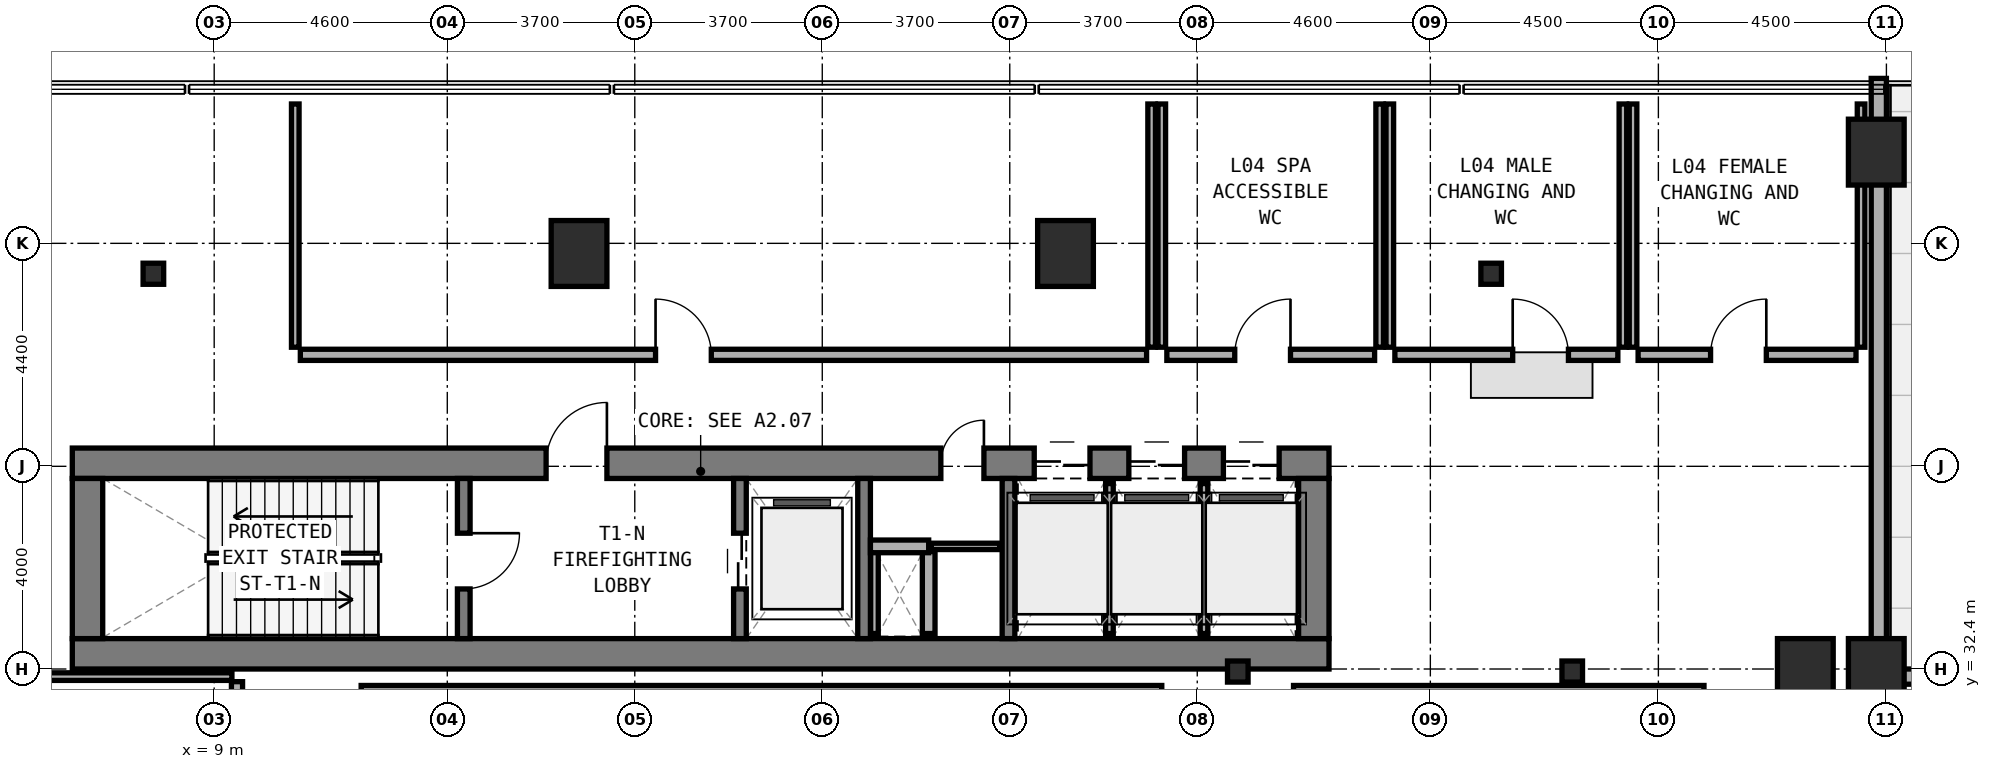
"""IFC4 building model, lengths in metres.
Left out: names, types, materials, properties, quantities, classifications, styles, units other than length and angle.
Written with IfcOpenShell. Run it as: python <this file> out.ifc"""

import sys

from ifc_helpers import new_model, si_unit, direction, frame, frame_2d, origin, origin_2d, place, context, subcontext, project, spatial, rectangle, i_section, extrude, element, fill, save


model = new_model("IFC4")
c1 = context("Model", 3, precision=1e-05, world=origin(), true_north=direction((0.0, 1.0)))
c2 = subcontext(c1, "Body", "Model", "MODEL_VIEW")
j1 = project(units=[si_unit("LENGTHUNIT", "METRE"), si_unit("PLANEANGLEUNIT", "RADIAN")], contexts=[c1])
p1 = place(None, origin())
s1 = spatial("IfcSite", under=j1, at=p1, CompositionType="ELEMENT")
p2 = place(p1, origin())
s2 = spatial("IfcBuilding", under=s1, at=p2, CompositionType="ELEMENT")
p3 = place(p2, frame((0.0, 0.0, 19.5)))
s3 = spatial("IfcBuildingStorey", under=s2, at=p3, CompositionType="ELEMENT", Elevation=19.5)
p4 = place(p3, frame((6.2, 32.7, 0.0), z_axis=(0.0, 0.0, 1.0), x_axis=(1.0, 0.0, 0.0)))
e1 = element("IfcWall", 1, at=p4, inside=s3, PredefinedType="SHEAR", context=c2, shape_type="SweptSolid", body=[
    extrude(rectangle(XDim=24.8, YDim=0.6, at=frame_2d((12.4, 0.0))), origin(), (0.0, 0.0, 1.0), 4.5),
])
p5 = place(p3, frame((6.2, 36.46, 0.0), z_axis=(0.0, 0.0, 1.0), x_axis=(1.0, 0.0, 0.0)))
e2 = element("IfcWall", 2, at=p5, inside=s3, PredefinedType="SHEAR", context=c2, shape_type="SweptSolid", body=[
    extrude(rectangle(XDim=24.8, YDim=0.6, at=frame_2d((12.4, 0.0))), origin(), (0.0, 0.0, 1.0), 4.5),
])
p6 = place(p5, frame((9.35, 0.0, 0.0)))
e3 = element("IfcOpeningElement", 3, at=p6, cuts=e2, PredefinedType="OPENING", context=c2, shape_type="SweptSolid", body=[
    extrude(rectangle(XDim=1.2, YDim=2.15, at=frame_2d((0.6, 1.075))), frame((0.0, 0.31, 0.0), z_axis=(0.0, -1.0, 0.0), x_axis=(1.0, 0.0, 0.0)), (0.0, 0.0, 1.0), 0.62),
])
p7 = place(p5, frame((17.14, 0.0, 0.0)))
e4 = element("IfcOpeningElement", 4, at=p7, cuts=e2, PredefinedType="OPENING", context=c2, shape_type="SweptSolid", body=[
    extrude(rectangle(XDim=0.85, YDim=2.1, at=frame_2d((0.425, 1.05))), frame((0.0, 0.31, 0.0), z_axis=(0.0, -1.0, 0.0), x_axis=(1.0, 0.0, 0.0)), (0.0, 0.0, 1.0), 0.62),
])
p8 = place(p5, frame((18.983, 0.0, 0.0)))
e5 = element("IfcOpeningElement", 5, at=p8, cuts=e2, PredefinedType="OPENING", context=c2, shape_type="SweptSolid", body=[
    extrude(rectangle(XDim=1.1, YDim=2.15, at=frame_2d((0.55, 1.075))), frame((0.0, 0.31, 0.0), z_axis=(0.0, -1.0, 0.0), x_axis=(1.0, 0.0, 0.0)), (0.0, 0.0, 1.0), 0.62),
])
p9 = place(p5, frame((20.85, 0.0, 0.0)))
e6 = element("IfcOpeningElement", 6, at=p9, cuts=e2, PredefinedType="OPENING", context=c2, shape_type="SweptSolid", body=[
    extrude(rectangle(XDim=1.1, YDim=2.15, at=frame_2d((0.55, 1.075))), frame((0.0, 0.31, 0.0), z_axis=(0.0, -1.0, 0.0), x_axis=(1.0, 0.0, 0.0)), (0.0, 0.0, 1.0), 0.62),
])
p10 = place(p5, frame((22.716, 0.0, 0.0)))
e7 = element("IfcOpeningElement", 7, at=p10, cuts=e2, PredefinedType="OPENING", context=c2, shape_type="SweptSolid", body=[
    extrude(rectangle(XDim=1.1, YDim=2.15, at=frame_2d((0.55, 1.075))), frame((0.0, 0.31, 0.0), z_axis=(0.0, -1.0, 0.0), x_axis=(1.0, 0.0, 0.0)), (0.0, 0.0, 1.0), 0.62),
])
for number, where, z_axis, x_axis in (
    (8, (6.5, 33.0, 0.0), (0.0, 0.0, 1.0), (0.0, 1.0, 0.0)),
    (9, (30.7, 33.0, 0.0), (0.0, 0.0, 1.0), (0.0, 1.0, 0.0)),
):
    element("IfcWall", number, at=place(p3, frame(where, z_axis=z_axis, x_axis=x_axis)), inside=s3, PredefinedType="SHEAR", context=c2, shape_type="SweptSolid", body=[
        extrude(rectangle(XDim=3.16, YDim=0.6, at=frame_2d((1.58, 0.0))), origin(), (0.0, 0.0, 1.0), 4.5),
    ])
p11 = place(p3, frame((13.925, 33.0, 0.0), z_axis=(0.0, 0.0, 1.0), x_axis=(0.0, 1.0, 0.0)))
e10 = element("IfcWall", 10, at=p11, inside=s3, PredefinedType="STANDARD", context=c2, shape_type="SweptSolid", body=[
    extrude(rectangle(XDim=3.16, YDim=0.25, at=frame_2d((1.58, 0.0))), origin(), (0.0, 0.0, 1.0), 4.22),
])
p12 = place(p11, frame((0.98, 0.0, 0.0)))
e11 = element("IfcOpeningElement", 11, at=p12, cuts=e10, PredefinedType="OPENING", context=c2, shape_type="SweptSolid", body=[
    extrude(rectangle(XDim=1.1, YDim=2.15, at=frame_2d((0.55, 1.075))), frame((0.0, 0.135, 0.0), z_axis=(0.0, -1.0, 0.0), x_axis=(1.0, 0.0, 0.0)), (0.0, 0.0, 1.0), 0.27),
])
p13 = place(p3, frame((19.375, 33.0, 0.0), z_axis=(0.0, 0.0, 1.0), x_axis=(0.0, 1.0, 0.0)))
e12 = element("IfcWall", 12, at=p13, inside=s3, PredefinedType="STANDARD", context=c2, shape_type="SweptSolid", body=[
    extrude(rectangle(XDim=3.16, YDim=0.25, at=frame_2d((1.58, 0.0))), origin(), (0.0, 0.0, 1.0), 4.22),
])
p14 = place(p13, frame((0.98, 0.0, 0.0)))
e13 = element("IfcOpeningElement", 13, at=p14, cuts=e12, PredefinedType="OPENING", context=c2, shape_type="SweptSolid", body=[
    extrude(rectangle(XDim=1.1, YDim=2.15, at=frame_2d((0.55, 1.075))), frame((0.0, 0.135, 0.0), z_axis=(0.0, -1.0, 0.0), x_axis=(1.0, 0.0, 0.0)), (0.0, 0.0, 1.0), 0.27),
])
for number, where, z_axis, x_axis in (
    (14, (21.825, 33.0, 0.0), (0.0, 0.0, 1.0), (0.0, 1.0, 0.0)),
    (15, (24.675, 33.0, 0.0), (0.0, 0.0, 1.0), (0.0, 1.0, 0.0)),
):
    element("IfcWall", number, at=place(p3, frame(where, z_axis=z_axis, x_axis=x_axis)), inside=s3, PredefinedType="STANDARD", context=c2, shape_type="SweptSolid", body=[
        extrude(rectangle(XDim=3.16, YDim=0.25, at=frame_2d((1.58, 0.0))), origin(), (0.0, 0.0, 1.0), 4.22),
    ])
for number, where, z_axis, x_axis in (
    (16, (16.2, 40.6, 0.0), (0.0, 0.0, 1.0), (1.0, 0.0, 0.0)),
    (17, (25.8, 40.6, 0.0), (0.0, 0.0, 1.0), (1.0, 0.0, 0.0)),
):
    element("IfcColumn", number, at=place(p3, frame(where, z_axis=z_axis, x_axis=x_axis)), inside=s3, PredefinedType="COLUMN", context=c2, shape_type="SweptSolid", body=[
        extrude(rectangle(XDim=1.1, YDim=1.3, at=origin_2d()), origin(), (0.0, 0.0, 1.0), 4.5),
    ])
for number, where, z_axis, x_axis in (
    (18, (34.2, 40.2, 0.0), (0.0, 0.0, 1.0), (1.0, 0.0, 0.0)),
    (19, (7.8, 40.2, 0.0), (0.0, 0.0, 1.0), (1.0, 0.0, 0.0)),
    (20, (35.8, 32.35, 0.0), (0.0, 0.0, 1.0), (1.0, 0.0, 0.0)),
    (21, (29.2, 32.35, 0.0), (0.0, 0.0, 1.0), (1.0, 0.0, 0.0)),
):
    element("IfcColumn", number, at=place(p3, frame(where, z_axis=z_axis, x_axis=x_axis)), inside=s3, PredefinedType="COLUMN", context=c2, shape_type="SweptSolid", body=[
        extrude(i_section(OverallWidth=0.406, OverallDepth=0.416, WebThickness=0.024, FlangeThickness=0.039, FilletRadius=0.015, at=origin_2d()), origin(), (0.0, 0.0, 1.0), 4.5),
    ])
for number, where, z_axis, x_axis in (
    (22, (40.4, 32.35, 0.0), (0.0, 0.0, 1.0), (1.0, 0.0, 0.0)),
    (23, (41.8, 32.35, 0.0), (0.0, 0.0, 1.0), (1.0, 0.0, 0.0)),
    (24, (41.8, 42.6, 0.0), (0.0, 0.0, 1.0), (1.0, 0.0, 0.0)),
):
    element("IfcColumn", number, at=place(p3, frame(where, z_axis=z_axis, x_axis=x_axis)), inside=s3, PredefinedType="COLUMN", context=c2, shape_type="SweptSolid", body=[
        extrude(rectangle(XDim=1.1, YDim=1.3, at=origin_2d()), origin(), (0.0, 0.0, 1.0), 4.5),
    ])
p15 = place(p3, frame((47.341, 32.25, 0.0), z_axis=(0.0, 0.0, 1.0), x_axis=(-1.0, 0.0, 0.0)))
e25 = element("IfcWall", 25, at=p15, inside=s3, PredefinedType="STANDARD", context=c2, shape_type="SweptSolid", body=[
    extrude(rectangle(XDim=5.366, YDim=0.3, at=frame_2d((2.683, 0.0))), origin(), (0.0, 0.0, 1.0), 4.22),
])
p16 = place(p15, frame((0.541, 0.0, 0.0)))
e26 = element("IfcOpeningElement", 26, at=p16, cuts=e25, PredefinedType="OPENING", context=c2, shape_type="SweptSolid", body=[
    extrude(rectangle(XDim=1.6, YDim=2.2, at=frame_2d((0.8, 1.1))), frame((0.0, 0.16, 0.0), z_axis=(0.0, -1.0, 0.0), x_axis=(1.0, 0.0, 0.0)), (0.0, 0.0, 1.0), 0.32),
])
p17 = place(p3, frame((41.85, 32.41, 0.0), z_axis=(0.0, 0.0, 1.0), x_axis=(0.0, 1.0, 0.0)))
e27 = element("IfcWall", 27, at=p17, inside=s3, PredefinedType="STANDARD", context=c2, shape_type="SweptSolid", body=[
    extrude(rectangle(XDim=11.645, YDim=0.3, at=frame_2d((5.823, 0.0))), origin(), (0.0, 0.0, 1.0), 4.22),
])
p18 = place(p3, frame((22.03, 33.1, 0.0), z_axis=(0.0, 0.0, 1.0), x_axis=(0.0, 1.0, 0.0)))
e28 = element("IfcWall", 28, at=p18, inside=s3, PredefinedType="PARTITIONING", context=c2, shape_type="SweptSolid", body=[
    extrude(rectangle(XDim=1.62, YDim=0.15, at=frame_2d((0.81, 0.0))), origin(), (0.0, 0.0, 1.0), 4.22),
])
p19 = place(p3, frame((23.1, 33.1, 0.0), z_axis=(0.0, 0.0, 1.0), x_axis=(0.0, 1.0, 0.0)))
e29 = element("IfcWall", 29, at=p19, inside=s3, PredefinedType="SOLIDWALL", context=c2, shape_type="SweptSolid", body=[
    extrude(rectangle(XDim=1.62, YDim=0.25, at=frame_2d((0.81, 0.0))), origin(), (0.0, 0.0, 1.0), 4.22),
])
p20 = place(p3, frame((21.95, 34.82, 0.0), z_axis=(0.0, 0.0, 1.0), x_axis=(1.0, 0.0, 0.0)))
e30 = element("IfcWall", 30, at=p20, inside=s3, PredefinedType="SOLIDWALL", context=c2, shape_type="SweptSolid", body=[
    extrude(rectangle(XDim=1.15, YDim=0.25, at=frame_2d((0.575, 0.0))), origin(), (0.0, 0.0, 1.0), 4.22),
])
p21 = place(p3, frame((23.15, 34.82, 0.0), z_axis=(0.0, 0.0, 1.0), x_axis=(1.0, 0.0, 0.0)))
e31 = element("IfcWall", 31, at=p21, inside=s3, PredefinedType="PARTITIONING", context=c2, shape_type="SweptSolid", body=[
    extrude(rectangle(XDim=1.35, YDim=0.125, at=frame_2d((0.675, 0.0))), origin(), (0.0, 0.0, 1.0), 4.22),
])
p22 = place(p3, frame((26.667, 33.1, 0.0), z_axis=(0.0, 0.0, 1.0), x_axis=(0.0, 1.0, 0.0)))
e32 = element("IfcWall", 32, at=p22, inside=s3, PredefinedType="PARTITIONING", context=c2, shape_type="SweptSolid", body=[
    extrude(rectangle(XDim=2.96, YDim=0.15, at=frame_2d((1.48, 0.0))), origin(), (0.0, 0.0, 1.0), 4.22),
])
p23 = place(p3, frame((28.533, 33.1, 0.0), z_axis=(0.0, 0.0, 1.0), x_axis=(0.0, 1.0, 0.0)))
e33 = element("IfcWall", 33, at=p23, inside=s3, PredefinedType="PARTITIONING", context=c2, shape_type="SweptSolid", body=[
    extrude(rectangle(XDim=2.96, YDim=0.15, at=frame_2d((1.48, 0.0))), origin(), (0.0, 0.0, 1.0), 3.295),
])
p24 = place(p3, frame((11.9, 32.0, 0.0), z_axis=(0.0, 0.0, 1.0), x_axis=(1.0, 0.0, 0.0)))
e34 = element("IfcWall", 34, at=p24, inside=s3, PredefinedType="PARTITIONING", context=c2, shape_type="SweptSolid", body=[
    extrude(rectangle(XDim=15.8, YDim=0.15, at=frame_2d((7.9, 0.0))), origin(), (0.0, 0.0, 1.0), 4.22),
])
for number, where, z_axis, x_axis in (
    (35, (10.6, 38.75, 0.0), (0.0, 0.0, 1.0), (0.0, 1.0, 0.0)),
    (36, (27.5, 38.75, 0.0), (0.0, 0.0, 1.0), (0.0, 1.0, 0.0)),
):
    element("IfcWall", number, at=place(p3, frame(where, z_axis=z_axis, x_axis=x_axis)), inside=s3, PredefinedType="PARTITIONING", context=c2, shape_type="SweptSolid", body=[
        extrude(rectangle(XDim=4.8, YDim=0.15, at=frame_2d((2.4, 0.0))), origin(), (0.0, 0.0, 1.0), 3.745),
    ])
p25 = place(p3, frame((10.7, 38.6, 0.0), z_axis=(0.0, 0.0, 1.0), x_axis=(1.0, 0.0, 0.0)))
e37 = element("IfcWall", 37, at=p25, inside=s3, PredefinedType="SOLIDWALL", context=c2, shape_type="SweptSolid", body=[
    extrude(rectangle(XDim=16.7, YDim=0.22, at=frame_2d((8.35, 0.0))), origin(), (0.0, 0.0, 1.0), 3.295),
])
p26 = place(p25, frame((7.01, 0.0, 0.0)))
e38 = element("IfcOpeningElement", 38, at=p26, cuts=e37, PredefinedType="OPENING", context=c2, shape_type="SweptSolid", body=[
    extrude(rectangle(XDim=1.1, YDim=2.1, at=frame_2d((0.55, 1.05))), frame((0.0, 0.12, 0.0), z_axis=(0.0, -1.0, 0.0), x_axis=(1.0, 0.0, 0.0)), (0.0, 0.0, 1.0), 0.24),
])
p27 = place(p3, frame((30.3, 32.0, 0.0), z_axis=(0.0, 0.0, 1.0), x_axis=(1.0, 0.0, 0.0)))
e39 = element("IfcWall", 39, at=p27, inside=s3, PredefinedType="PARTITIONING", context=c2, shape_type="SweptSolid", body=[
    extrude(rectangle(XDim=8.1, YDim=0.15, at=frame_2d((4.05, 0.0))), origin(), (0.0, 0.0, 1.0), 3.745),
])
for number, where, z_axis, x_axis in (
    (40, (27.7, 38.75, 0.0), (0.0, 0.0, 1.0), (0.0, 1.0, 0.0)),
    (41, (32.0, 38.75, 0.0), (0.0, 0.0, 1.0), (0.0, 1.0, 0.0)),
):
    element("IfcWall", number, at=place(p3, frame(where, z_axis=z_axis, x_axis=x_axis)), inside=s3, PredefinedType="PARTITIONING", context=c2, shape_type="SweptSolid", body=[
        extrude(rectangle(XDim=4.8, YDim=0.15, at=frame_2d((2.4, 0.0))), origin(), (0.0, 0.0, 1.0), 3.745),
    ])
p28 = place(p3, frame((27.8, 38.6, 0.0), z_axis=(0.0, 0.0, 1.0), x_axis=(1.0, 0.0, 0.0)))
e42 = element("IfcWall", 42, at=p28, inside=s3, PredefinedType="SOLIDWALL", context=c2, shape_type="SweptSolid", body=[
    extrude(rectangle(XDim=4.1, YDim=0.22, at=frame_2d((2.05, 0.0))), origin(), (0.0, 0.0, 1.0), 3.925),
])
p29 = place(p28, frame((1.34, 0.0, 0.0)))
e43 = element("IfcOpeningElement", 43, at=p29, cuts=e42, PredefinedType="OPENING", context=c2, shape_type="SweptSolid", body=[
    extrude(rectangle(XDim=1.1, YDim=2.1, at=frame_2d((0.55, 1.05))), frame((0.0, 0.12, 0.0), z_axis=(0.0, -1.0, 0.0), x_axis=(1.0, 0.0, 0.0)), (0.0, 0.0, 1.0), 0.24),
])
p30 = place(p3, frame((32.2, 38.75, 0.0), z_axis=(0.0, 0.0, 1.0), x_axis=(0.0, 1.0, 0.0)))
e44 = element("IfcWall", 44, at=p30, inside=s3, PredefinedType="PARTITIONING", context=c2, shape_type="SweptSolid", body=[
    extrude(rectangle(XDim=4.8, YDim=0.15, at=frame_2d((2.4, 0.0))), origin(), (0.0, 0.0, 1.0), 3.745),
])
p31 = place(p3, frame((36.8, 38.75, 0.0), z_axis=(0.0, 0.0, 1.0), x_axis=(0.0, 1.0, 0.0)))
e45 = element("IfcWall", 45, at=p31, inside=s3, PredefinedType="PARTITIONING", context=c2, shape_type="SweptSolid", body=[
    extrude(rectangle(XDim=4.8, YDim=0.15, at=frame_2d((2.4, 0.0))), origin(), (0.0, 0.0, 1.0), 4.22),
])
p32 = place(p3, frame((32.3, 38.6, 0.0), z_axis=(0.0, 0.0, 1.0), x_axis=(1.0, 0.0, 0.0)))
e46 = element("IfcWall", 46, at=p32, inside=s3, PredefinedType="SOLIDWALL", context=c2, shape_type="SweptSolid", body=[
    extrude(rectangle(XDim=4.4, YDim=0.22, at=frame_2d((2.2, 0.0))), origin(), (0.0, 0.0, 1.0), 3.295),
])
p33 = place(p32, frame((2.325, 0.0, 0.0)))
e47 = element("IfcOpeningElement", 47, at=p33, cuts=e46, PredefinedType="OPENING", context=c2, shape_type="SweptSolid", body=[
    extrude(rectangle(XDim=1.1, YDim=2.1, at=frame_2d((0.55, 1.05))), frame((0.0, 0.12, 0.0), z_axis=(0.0, -1.0, 0.0), x_axis=(1.0, 0.0, 0.0)), (0.0, 0.0, 1.0), 0.24),
])
for number, where, z_axis, x_axis in (
    (48, (37.0, 38.75, 0.0), (0.0, 0.0, 1.0), (0.0, 1.0, 0.0)),
    (49, (41.5, 38.75, 0.0), (0.0, 0.0, 1.0), (0.0, 1.0, 0.0)),
):
    element("IfcWall", number, at=place(p3, frame(where, z_axis=z_axis, x_axis=x_axis)), inside=s3, PredefinedType="PARTITIONING", context=c2, shape_type="SweptSolid", body=[
        extrude(rectangle(XDim=4.8, YDim=0.15, at=frame_2d((2.4, 0.0))), origin(), (0.0, 0.0, 1.0), 4.22),
    ])
p34 = place(p3, frame((37.1, 38.6, 0.0), z_axis=(0.0, 0.0, 1.0), x_axis=(1.0, 0.0, 0.0)))
e50 = element("IfcWall", 50, at=p34, inside=s3, PredefinedType="SOLIDWALL", context=c2, shape_type="SweptSolid", body=[
    extrude(rectangle(XDim=4.3, YDim=0.22, at=frame_2d((2.15, 0.0))), origin(), (0.0, 0.0, 1.0), 4.22),
])
p35 = place(p34, frame((1.43, 0.0, 0.0)))
e51 = element("IfcOpeningElement", 51, at=p35, cuts=e50, PredefinedType="OPENING", context=c2, shape_type="SweptSolid", body=[
    extrude(rectangle(XDim=1.1, YDim=2.1, at=frame_2d((0.55, 1.05))), frame((0.0, 0.12, 0.0), z_axis=(0.0, -1.0, 0.0), x_axis=(1.0, 0.0, 0.0)), (0.0, 0.0, 1.0), 0.24),
])
p36 = place(p3, frame((0.45, 32.25, 0.0), z_axis=(0.0, 0.0, 1.0), x_axis=(1.0, 0.0, 0.0)))
e52 = element("IfcWall", 52, at=p36, inside=s3, PredefinedType="PARTITIONING", context=c2, shape_type="SweptSolid", body=[
    extrude(rectangle(XDim=8.9, YDim=0.15, at=frame_2d((4.45, 0.0))), origin(), (0.0, 0.0, 1.0), 4.22),
])
p37 = place(p3, frame((9.45, 27.3, 0.0), z_axis=(0.0, 0.0, 1.0), x_axis=(0.0, 1.0, 0.0)))
e53 = element("IfcWall", 53, at=p37, inside=s3, PredefinedType="SOLIDWALL", context=c2, shape_type="SweptSolid", body=[
    extrude(rectangle(XDim=4.85, YDim=0.22, at=frame_2d((2.425, 0.0))), origin(), (0.0, 0.0, 1.0), 3.295),
])
p38 = place(p37, frame((1.678, 0.0, 0.0)))
e54 = element("IfcOpeningElement", 54, at=p38, cuts=e53, PredefinedType="OPENING", context=c2, shape_type="SweptSolid", body=[
    extrude(rectangle(XDim=1.1, YDim=2.1, at=frame_2d((0.55, 1.05))), frame((0.0, 0.12, 0.0), z_axis=(0.0, -1.0, 0.0), x_axis=(1.0, 0.0, 0.0)), (0.0, 0.0, 1.0), 0.24),
])
p39 = place(p12, frame((1.1, 0.0, 0.0), z_axis=(0.0, 0.0, 1.0), x_axis=(-1.0, 0.0, 0.0)))
e55 = element("IfcDoor", 55, at=p39, inside=s3, OperationType="SINGLE_SWING_LEFT", PredefinedType="DOOR", context=c2, shape_type="SweptSolid", body=[
    extrude(rectangle(XDim=1.1, YDim=2.15, at=frame_2d((0.55, 1.075))), frame((0.0, 0.025, 0.0), z_axis=(0.0, -1.0, 0.0), x_axis=(1.0, 0.0, 0.0)), (0.0, 0.0, 1.0), 0.05),
])
fill(e11, e55)
p40 = place(p6, origin())
e56 = element("IfcDoor", 56, at=p40, inside=s3, OperationType="SINGLE_SWING_RIGHT", PredefinedType="DOOR", context=c2, shape_type="SweptSolid", body=[
    extrude(rectangle(XDim=1.2, YDim=2.15, at=frame_2d((0.6, 1.075))), frame((0.0, 0.025, 0.0), z_axis=(0.0, -1.0, 0.0), x_axis=(1.0, 0.0, 0.0)), (0.0, 0.0, 1.0), 0.05),
])
fill(e3, e56)
p41 = place(p14, origin())
e57 = element("IfcDoor", 57, at=p41, inside=s3, OperationType="DOUBLE_DOOR_SLIDING", PredefinedType="DOOR", context=c2, shape_type="SweptSolid", body=[
    extrude(rectangle(XDim=1.1, YDim=2.15, at=frame_2d((0.55, 1.075))), frame((0.0, 0.025, 0.0), z_axis=(0.0, -1.0, 0.0), x_axis=(1.0, 0.0, 0.0)), (0.0, 0.0, 1.0), 0.05),
])
fill(e13, e57)
p42 = place(p7, origin())
e58 = element("IfcDoor", 58, at=p42, inside=s3, OperationType="SINGLE_SWING_RIGHT", PredefinedType="DOOR", context=c2, shape_type="SweptSolid", body=[
    extrude(rectangle(XDim=0.85, YDim=2.1, at=frame_2d((0.425, 1.05))), frame((0.0, 0.025, 0.0), z_axis=(0.0, -1.0, 0.0), x_axis=(1.0, 0.0, 0.0)), (0.0, 0.0, 1.0), 0.05),
])
fill(e4, e58)
p43 = place(p8, origin())
e59 = element("IfcDoor", 59, at=p43, inside=s3, OperationType="DOUBLE_DOOR_SLIDING", PredefinedType="DOOR", context=c2, shape_type="SweptSolid", body=[
    extrude(rectangle(XDim=1.1, YDim=2.15, at=frame_2d((0.55, 1.075))), frame((0.0, 0.025, 0.0), z_axis=(0.0, -1.0, 0.0), x_axis=(1.0, 0.0, 0.0)), (0.0, 0.0, 1.0), 0.05),
])
fill(e5, e59)
p44 = place(p9, origin())
e60 = element("IfcDoor", 60, at=p44, inside=s3, OperationType="DOUBLE_DOOR_SLIDING", PredefinedType="DOOR", context=c2, shape_type="SweptSolid", body=[
    extrude(rectangle(XDim=1.1, YDim=2.15, at=frame_2d((0.55, 1.075))), frame((0.0, 0.025, 0.0), z_axis=(0.0, -1.0, 0.0), x_axis=(1.0, 0.0, 0.0)), (0.0, 0.0, 1.0), 0.05),
])
fill(e6, e60)
p45 = place(p10, origin())
e61 = element("IfcDoor", 61, at=p45, inside=s3, OperationType="DOUBLE_DOOR_SLIDING", PredefinedType="DOOR", context=c2, shape_type="SweptSolid", body=[
    extrude(rectangle(XDim=1.1, YDim=2.15, at=frame_2d((0.55, 1.075))), frame((0.0, 0.025, 0.0), z_axis=(0.0, -1.0, 0.0), x_axis=(1.0, 0.0, 0.0)), (0.0, 0.0, 1.0), 0.05),
])
fill(e7, e61)
p46 = place(p26, origin())
e62 = element("IfcDoor", 62, at=p46, inside=s3, OperationType="SINGLE_SWING_LEFT", PredefinedType="DOOR", context=c2, shape_type="SweptSolid", body=[
    extrude(rectangle(XDim=1.1, YDim=2.1, at=frame_2d((0.55, 1.05))), frame((0.0, 0.025, 0.0), z_axis=(0.0, -1.0, 0.0), x_axis=(1.0, 0.0, 0.0)), (0.0, 0.0, 1.0), 0.05),
])
fill(e38, e62)
p47 = place(p29, origin())
e63 = element("IfcDoor", 63, at=p47, inside=s3, OperationType="SINGLE_SWING_RIGHT", PredefinedType="DOOR", context=c2, shape_type="SweptSolid", body=[
    extrude(rectangle(XDim=1.1, YDim=2.1, at=frame_2d((0.55, 1.05))), frame((0.0, 0.025, 0.0), z_axis=(0.0, -1.0, 0.0), x_axis=(1.0, 0.0, 0.0)), (0.0, 0.0, 1.0), 0.05),
])
fill(e43, e63)
p48 = place(p33, origin())
e64 = element("IfcDoor", 64, at=p48, inside=s3, OperationType="SINGLE_SWING_LEFT", PredefinedType="DOOR", context=c2, shape_type="SweptSolid", body=[
    extrude(rectangle(XDim=1.1, YDim=2.1, at=frame_2d((0.55, 1.05))), frame((0.0, 0.025, 0.0), z_axis=(0.0, -1.0, 0.0), x_axis=(1.0, 0.0, 0.0)), (0.0, 0.0, 1.0), 0.05),
])
fill(e47, e64)
p49 = place(p35, origin())
e65 = element("IfcDoor", 65, at=p49, inside=s3, OperationType="SINGLE_SWING_RIGHT", PredefinedType="DOOR", context=c2, shape_type="SweptSolid", body=[
    extrude(rectangle(XDim=1.1, YDim=2.1, at=frame_2d((0.55, 1.05))), frame((0.0, 0.025, 0.0), z_axis=(0.0, -1.0, 0.0), x_axis=(1.0, 0.0, 0.0)), (0.0, 0.0, 1.0), 0.05),
])
fill(e51, e65)
save(model, sys.argv[1])
